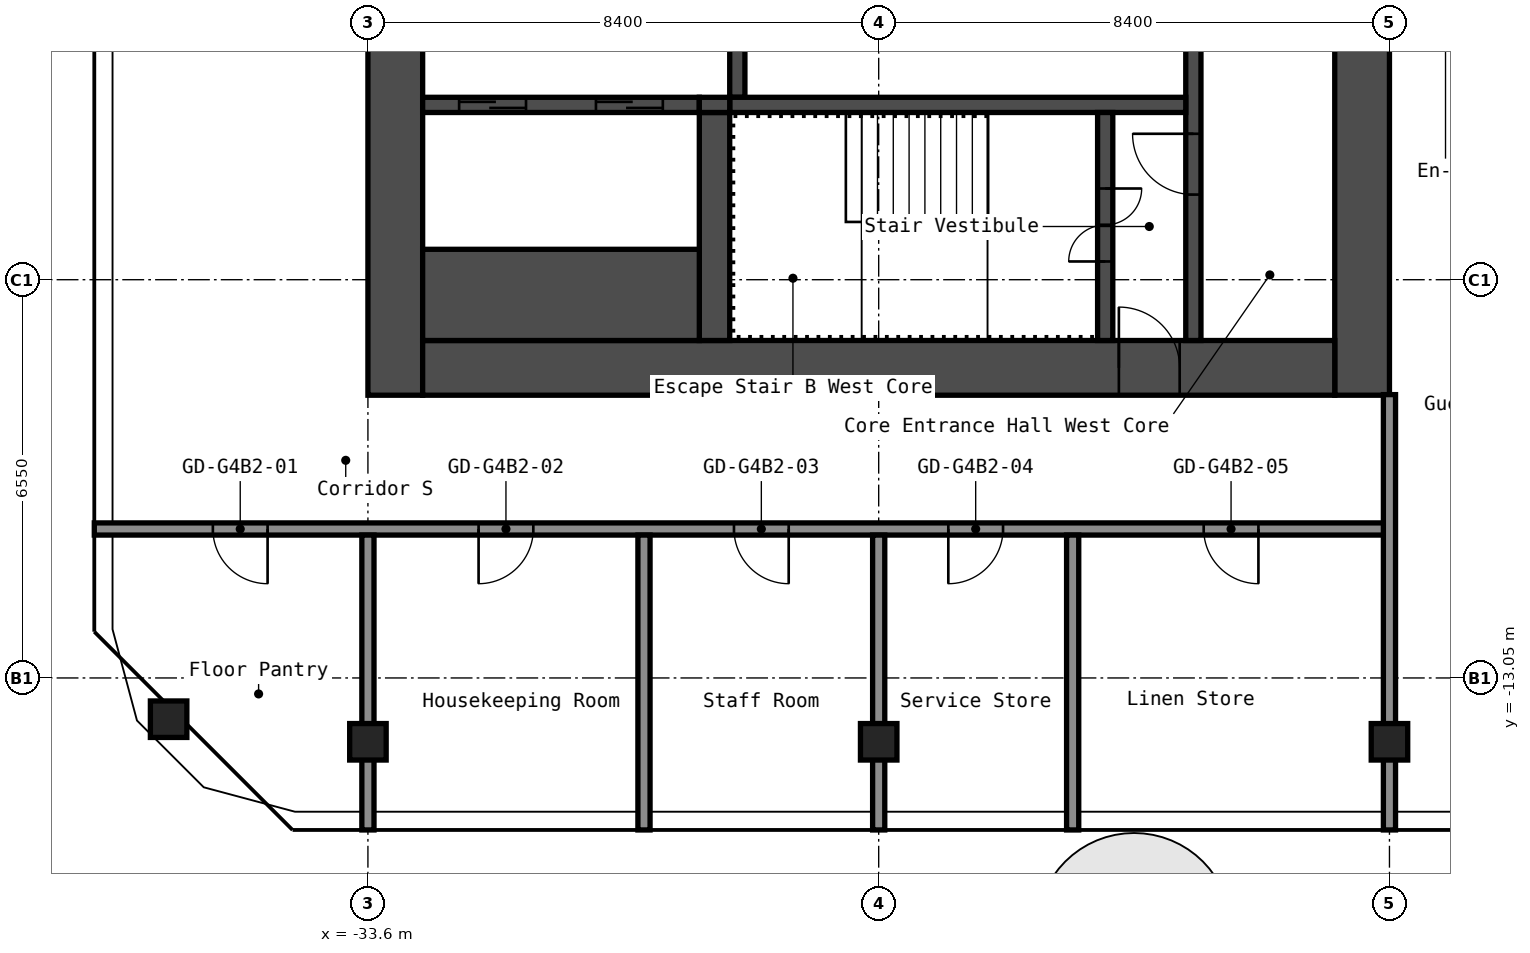
"""IFC4 building model, lengths in metres.
Left out: names, types, materials, properties, quantities, classifications, styles, units other than length and angle.
Written with IfcOpenShell. Run it as: python <this file> out.ifc"""

import sys

from ifc_helpers import new_model, si_unit, direction, frame, frame_2d, origin, origin_2d, place, context, subcontext, project, spatial, rectangle, hollow_rectangle, extrude, element, fill, save


model = new_model("IFC4")
c1 = context("Model", 3, precision=1e-05, world=origin(), true_north=direction((0.0, 1.0)))
c2 = subcontext(c1, "Body", "Model", "MODEL_VIEW")
j1 = project(units=[si_unit("LENGTHUNIT", "METRE"), si_unit("PLANEANGLEUNIT", "RADIAN")], contexts=[c1])
p1 = place(None, origin())
s1 = spatial("IfcSite", under=j1, at=p1, CompositionType="ELEMENT")
p2 = place(p1, origin())
s2 = spatial("IfcBuilding", under=s1, at=p2, CompositionType="ELEMENT")
p3 = place(p2, frame((0.0, 0.0, 221.8)))
s3 = spatial("IfcBuildingStorey", under=s2, at=p3, CompositionType="ELEMENT", Elevation=221.8)
for number, where, z_axis, x_axis in (
    (1, (-36.878, -13.729, 0.0), (0.0, 0.0, 1.0), (1.0, 0.0, 0.0)),
    (2, (-33.6, -14.1, 0.0), (0.0, 0.0, 1.0), (1.0, 0.0, 0.0)),
    (3, (-25.2, -14.1, 0.0), (0.0, 0.0, 1.0), (1.0, 0.0, 0.0)),
    (4, (-16.8, -14.1, 0.0), (0.0, 0.0, 1.0), (1.0, 0.0, 0.0)),
):
    element("IfcColumn", number, at=place(p3, frame(where, z_axis=z_axis, x_axis=x_axis)), inside=s3, PredefinedType="COLUMN", context=c2, shape_type="SweptSolid", body=[
        extrude(hollow_rectangle(XDim=0.6, YDim=0.6, WallThickness=0.025, InnerFilletRadius=0.038, OuterFilletRadius=0.062, at=origin_2d()), origin(), (0.0, 0.0, 1.0), 2.75),
    ])
p4 = place(p3, frame((-17.25, -8.4, 0.0), z_axis=(0.0, 0.0, 1.0), x_axis=(0.0, 1.0, 0.0)))
e5 = element("IfcWall", 5, at=p4, inside=s3, PredefinedType="SHEAR", context=c2, shape_type="SweptSolid", body=[
    extrude(rectangle(XDim=16.8, YDim=0.9, at=frame_2d((8.4, 0.0))), origin(), (0.0, 0.0, 1.0), 2.75),
])
p5 = place(p4, frame((10.1, 0.0, 0.0)))
e6 = element("IfcOpeningElement", 6, at=p5, cuts=e5, PredefinedType="OPENING", context=c2, shape_type="SweptSolid", body=[
    extrude(rectangle(XDim=1.6, YDim=2.1, at=frame_2d((0.8, 1.05))), frame((0.0, 0.46, 0.0), z_axis=(0.0, -1.0, 0.0), x_axis=(1.0, 0.0, 0.0)), (0.0, 0.0, 1.0), 0.92),
])
p6 = place(p3, frame((-33.15, -8.4, 0.0), z_axis=(0.0, 0.0, 1.0), x_axis=(0.0, 1.0, 0.0)))
e7 = element("IfcWall", 7, at=p6, inside=s3, PredefinedType="SHEAR", context=c2, shape_type="SweptSolid", body=[
    extrude(rectangle(XDim=16.8, YDim=0.9, at=frame_2d((8.4, 0.0))), origin(), (0.0, 0.0, 1.0), 2.75),
])
p7 = place(p3, frame((-32.7, -7.95, 0.0), z_axis=(0.0, 0.0, 1.0), x_axis=(1.0, 0.0, 0.0)))
e8 = element("IfcWall", 8, at=p7, inside=s3, PredefinedType="SHEAR", context=c2, shape_type="SweptSolid", body=[
    extrude(rectangle(XDim=15.0, YDim=0.9, at=frame_2d((7.5, 0.0))), origin(), (0.0, 0.0, 1.0), 2.75),
])
p8 = place(p7, frame((11.45, 0.0, 0.0)))
e9 = element("IfcOpeningElement", 9, at=p8, cuts=e8, PredefinedType="OPENING", context=c2, shape_type="SweptSolid", body=[
    extrude(rectangle(XDim=1.0, YDim=2.1, at=frame_2d((0.5, 1.05))), frame((0.0, 0.46, 0.0), z_axis=(0.0, -1.0, 0.0), x_axis=(1.0, 0.0, 0.0)), (0.0, 0.0, 1.0), 0.92),
])
p9 = place(p3, frame((-20.025, -7.5, 0.0), z_axis=(0.0, 0.0, 1.0), x_axis=(0.0, 1.0, 0.0)))
e10 = element("IfcWall", 10, at=p9, inside=s3, PredefinedType="SHEAR", context=c2, shape_type="SweptSolid", body=[
    extrude(rectangle(XDim=6.3, YDim=0.25, at=frame_2d((3.15, 0.0))), origin(), (0.0, 0.0, 1.0), 2.75),
])
p10 = place(p9, frame((2.4, 0.0, 0.0)))
e11 = element("IfcOpeningElement", 11, at=p10, cuts=e10, PredefinedType="OPENING", context=c2, shape_type="SweptSolid", body=[
    extrude(rectangle(XDim=1.0, YDim=2.1, at=frame_2d((0.5, 1.05))), frame((0.0, 0.135, 0.0), z_axis=(0.0, -1.0, 0.0), x_axis=(1.0, 0.0, 0.0)), (0.0, 0.0, 1.0), 0.27),
])
p11 = place(p3, frame((-27.525, -3.5, 0.0), z_axis=(0.0, 0.0, 1.0), x_axis=(0.0, 1.0, 0.0)))
e12 = element("IfcWall", 12, at=p11, inside=s3, PredefinedType="SHEAR", context=c2, shape_type="SweptSolid", body=[
    extrude(rectangle(XDim=2.05, YDim=0.25, at=frame_2d((1.025, 0.0))), origin(), (0.0, 0.0, 1.0), 2.75),
])
p12 = place(p3, frame((-27.65, -3.625, 0.0), z_axis=(0.0, 0.0, 1.0), x_axis=(1.0, 0.0, 0.0)))
e13 = element("IfcWall", 13, at=p12, inside=s3, PredefinedType="SHEAR", context=c2, shape_type="SweptSolid", body=[
    extrude(rectangle(XDim=7.5, YDim=0.25, at=frame_2d((3.75, 0.0))), origin(), (0.0, 0.0, 1.0), 2.75),
])
p13 = place(p3, frame((-21.475, -7.5, 0.0), z_axis=(0.0, 0.0, 1.0), x_axis=(0.0, 1.0, 0.0)))
e14 = element("IfcWall", 14, at=p13, inside=s3, PredefinedType="SHEAR", context=c2, shape_type="SweptSolid", body=[
    extrude(rectangle(XDim=3.75, YDim=0.25, at=frame_2d((1.875, 0.0))), origin(), (0.0, 0.0, 1.0), 2.75),
])
p14 = place(p13, frame((1.3, 0.0, 0.0)))
e15 = element("IfcOpeningElement", 15, at=p14, cuts=e14, PredefinedType="OPENING", context=c2, shape_type="SweptSolid", body=[
    extrude(rectangle(XDim=1.2, YDim=2.1, at=frame_2d((0.6, 1.05))), frame((0.0, 0.135, 0.0), z_axis=(0.0, -1.0, 0.0), x_axis=(1.0, 0.0, 0.0)), (0.0, 0.0, 1.0), 0.27),
])
p15 = place(p3, frame((-27.9, -7.5, 0.0), z_axis=(0.0, 0.0, 1.0), x_axis=(0.0, 1.0, 0.0)))
e16 = element("IfcWall", 16, at=p15, inside=s3, PredefinedType="SHEAR", context=c2, shape_type="SweptSolid", body=[
    extrude(rectangle(XDim=3.75, YDim=0.5, at=frame_2d((1.875, 0.0))), origin(), (0.0, 0.0, 1.0), 2.75),
])
p16 = place(p3, frame((-32.7, -3.625, 0.0), z_axis=(0.0, 0.0, 1.0), x_axis=(1.0, 0.0, 0.0)))
e17 = element("IfcWall", 17, at=p16, inside=s3, PredefinedType="SHEAR", context=c2, shape_type="SweptSolid", body=[
    extrude(rectangle(XDim=4.55, YDim=0.25, at=frame_2d((2.275, 0.0))), origin(), (0.0, 0.0, 1.0), 2.75),
])
p17 = place(p16, frame((2.85, 0.0, 0.0)))
e18 = element("IfcOpeningElement", 18, at=p17, cuts=e17, PredefinedType="OPENING", context=c2, shape_type="SweptSolid", body=[
    extrude(rectangle(XDim=1.1, YDim=2.1, at=frame_2d((0.55, 1.05))), frame((0.0, 0.135, 0.0), z_axis=(0.0, -1.0, 0.0), x_axis=(1.0, 0.0, 0.0)), (0.0, 0.0, 1.0), 0.27),
])
p18 = place(p16, frame((0.6, 0.0, 0.0)))
e19 = element("IfcOpeningElement", 19, at=p18, cuts=e17, PredefinedType="OPENING", context=c2, shape_type="SweptSolid", body=[
    extrude(rectangle(XDim=1.1, YDim=2.1, at=frame_2d((0.55, 1.05))), frame((0.0, 0.135, 0.0), z_axis=(0.0, -1.0, 0.0), x_axis=(1.0, 0.0, 0.0)), (0.0, 0.0, 1.0), 0.27),
])
p19 = place(p3, frame((-32.7, -6.75, 0.0), z_axis=(0.0, 0.0, 1.0), x_axis=(1.0, 0.0, 0.0)))
e20 = element("IfcWall", 20, at=p19, inside=s3, PredefinedType="SHEAR", context=c2, shape_type="SweptSolid", body=[
    extrude(rectangle(XDim=4.55, YDim=1.5, at=frame_2d((2.275, 0.0))), origin(), (0.0, 0.0, 1.0), 2.75),
])
p20 = place(p3, frame((-28.15, -3.625, 0.0), z_axis=(0.0, 0.0, 1.0), x_axis=(1.0, 0.0, 0.0)))
e21 = element("IfcWall", 21, at=p20, inside=s3, PredefinedType="SHEAR", context=c2, shape_type="SweptSolid", body=[
    extrude(rectangle(XDim=0.5, YDim=0.25, at=frame_2d((0.25, 0.0))), origin(), (0.0, 0.0, 1.0), 2.75),
])
p21 = place(p3, frame((-38.1, -10.6, 0.0), z_axis=(0.0, 0.0, 1.0), x_axis=(1.0, 0.0, 0.0)))
e22 = element("IfcWall", 22, at=p21, inside=s3, PredefinedType="PARTITIONING", context=c2, shape_type="SweptSolid", body=[
    extrude(rectangle(XDim=21.3, YDim=0.2, at=frame_2d((10.65, 0.0))), origin(), (0.0, 0.0, 1.0), 2.75),
])
p22 = place(p21, frame((1.95, 0.0, 0.0)))
e23 = element("IfcOpeningElement", 23, at=p22, cuts=e22, PredefinedType="OPENING", context=c2, shape_type="SweptSolid", body=[
    extrude(rectangle(XDim=0.9, YDim=2.1, at=frame_2d((0.45, 1.05))), frame((0.0, 0.11, 0.0), z_axis=(0.0, -1.0, 0.0), x_axis=(1.0, 0.0, 0.0)), (0.0, 0.0, 1.0), 0.22),
])
p23 = place(p21, frame((6.32, 0.0, 0.0)))
e24 = element("IfcOpeningElement", 24, at=p23, cuts=e22, PredefinedType="OPENING", context=c2, shape_type="SweptSolid", body=[
    extrude(rectangle(XDim=0.9, YDim=2.1, at=frame_2d((0.45, 1.05))), frame((0.0, 0.11, 0.0), z_axis=(0.0, -1.0, 0.0), x_axis=(1.0, 0.0, 0.0)), (0.0, 0.0, 1.0), 0.22),
])
p24 = place(p21, frame((10.52, 0.0, 0.0)))
e25 = element("IfcOpeningElement", 25, at=p24, cuts=e22, PredefinedType="OPENING", context=c2, shape_type="SweptSolid", body=[
    extrude(rectangle(XDim=0.9, YDim=2.1, at=frame_2d((0.45, 1.05))), frame((0.0, 0.11, 0.0), z_axis=(0.0, -1.0, 0.0), x_axis=(1.0, 0.0, 0.0)), (0.0, 0.0, 1.0), 0.22),
])
p25 = place(p21, frame((14.045, 0.0, 0.0)))
e26 = element("IfcOpeningElement", 26, at=p25, cuts=e22, PredefinedType="OPENING", context=c2, shape_type="SweptSolid", body=[
    extrude(rectangle(XDim=0.9, YDim=2.1, at=frame_2d((0.45, 1.05))), frame((0.0, 0.11, 0.0), z_axis=(0.0, -1.0, 0.0), x_axis=(1.0, 0.0, 0.0)), (0.0, 0.0, 1.0), 0.22),
])
p26 = place(p21, frame((18.245, 0.0, 0.0)))
e27 = element("IfcOpeningElement", 27, at=p26, cuts=e22, PredefinedType="OPENING", context=c2, shape_type="SweptSolid", body=[
    extrude(rectangle(XDim=0.9, YDim=2.1, at=frame_2d((0.45, 1.05))), frame((0.0, 0.11, 0.0), z_axis=(0.0, -1.0, 0.0), x_axis=(1.0, 0.0, 0.0)), (0.0, 0.0, 1.0), 0.22),
])
for number, where, z_axis, x_axis in (
    (28, (-33.6, -15.55, 0.0), (0.0, 0.0, 1.0), (0.0, 1.0, 0.0)),
    (29, (-29.06, -15.55, 0.0), (0.0, 0.0, 1.0), (0.0, 1.0, 0.0)),
    (30, (-25.2, -15.55, 0.0), (0.0, 0.0, 1.0), (0.0, 1.0, 0.0)),
    (31, (-22.01, -15.55, 0.0), (0.0, 0.0, 1.0), (0.0, 1.0, 0.0)),
):
    element("IfcWall", number, at=place(p3, frame(where, z_axis=z_axis, x_axis=x_axis)), inside=s3, PredefinedType="PARTITIONING", context=c2, shape_type="SweptSolid", body=[
        extrude(rectangle(XDim=4.85, YDim=0.2, at=frame_2d((2.425, 0.0))), origin(), (0.0, 0.0, 1.0), 2.75),
    ])
p27 = place(p3, frame((-16.8, -15.55, 0.0), z_axis=(0.0, 0.0, 1.0), x_axis=(0.0, 1.0, 0.0)))
e32 = element("IfcWall", 32, at=p27, inside=s3, PredefinedType="PARTITIONING", context=c2, shape_type="SweptSolid", body=[
    extrude(rectangle(XDim=7.16, YDim=0.2, at=frame_2d((3.58, 0.0))), origin(), (0.0, 0.0, 1.0), 2.75),
])
p28 = place(p8, origin())
e33 = element("IfcDoor", 33, at=p28, inside=s3, OperationType="SINGLE_SWING_RIGHT", PredefinedType="DOOR", context=c2, shape_type="SweptSolid", body=[
    extrude(rectangle(XDim=1.0, YDim=2.1, at=frame_2d((0.5, 1.05))), frame((0.0, 0.025, 0.0), z_axis=(0.0, -1.0, 0.0), x_axis=(1.0, 0.0, 0.0)), (0.0, 0.0, 1.0), 0.05),
])
fill(e9, e33)
p29 = place(p14, origin())
e34 = element("IfcDoor", 34, at=p29, inside=s3, OperationType="DOUBLE_DOOR_SINGLE_SWING", PredefinedType="DOOR", context=c2, shape_type="SweptSolid", body=[
    extrude(rectangle(XDim=1.2, YDim=2.1, at=frame_2d((0.6, 1.05))), frame((0.0, 0.025, 0.0), z_axis=(0.0, -1.0, 0.0), x_axis=(1.0, 0.0, 0.0)), (0.0, 0.0, 1.0), 0.05),
])
fill(e15, e34)
p30 = place(p10, origin())
e35 = element("IfcDoor", 35, at=p30, inside=s3, OperationType="SINGLE_SWING_LEFT", PredefinedType="DOOR", context=c2, shape_type="SweptSolid", body=[
    extrude(rectangle(XDim=1.0, YDim=2.1, at=frame_2d((0.5, 1.05))), frame((0.0, 0.025, 0.0), z_axis=(0.0, -1.0, 0.0), x_axis=(1.0, 0.0, 0.0)), (0.0, 0.0, 1.0), 0.05),
])
fill(e11, e35)
p31 = place(p17, origin())
e36 = element("IfcDoor", 36, at=p31, inside=s3, OperationType="DOUBLE_DOOR_SLIDING", PredefinedType="DOOR", context=c2, shape_type="SweptSolid", body=[
    extrude(rectangle(XDim=1.1, YDim=2.1, at=frame_2d((0.55, 1.05))), frame((0.0, 0.025, 0.0), z_axis=(0.0, -1.0, 0.0), x_axis=(1.0, 0.0, 0.0)), (0.0, 0.0, 1.0), 0.05),
])
fill(e18, e36)
p32 = place(p18, origin())
e37 = element("IfcDoor", 37, at=p32, inside=s3, OperationType="DOUBLE_DOOR_SLIDING", PredefinedType="DOOR", context=c2, shape_type="SweptSolid", body=[
    extrude(rectangle(XDim=1.1, YDim=2.1, at=frame_2d((0.55, 1.05))), frame((0.0, 0.025, 0.0), z_axis=(0.0, -1.0, 0.0), x_axis=(1.0, 0.0, 0.0)), (0.0, 0.0, 1.0), 0.05),
])
fill(e19, e37)
p33 = place(p22, origin())
e38 = element("IfcDoor", 38, at=p33, inside=s3, OperationType="SINGLE_SWING_RIGHT", PredefinedType="DOOR", context=c2, shape_type="SweptSolid", body=[
    extrude(rectangle(XDim=0.9, YDim=2.1, at=frame_2d((0.45, 1.05))), frame((0.0, 0.025, 0.0), z_axis=(0.0, -1.0, 0.0), x_axis=(1.0, 0.0, 0.0)), (0.0, 0.0, 1.0), 0.05),
])
fill(e23, e38)
p34 = place(p23, origin())
e39 = element("IfcDoor", 39, at=p34, inside=s3, OperationType="SINGLE_SWING_LEFT", PredefinedType="DOOR", context=c2, shape_type="SweptSolid", body=[
    extrude(rectangle(XDim=0.9, YDim=2.1, at=frame_2d((0.45, 1.05))), frame((0.0, 0.025, 0.0), z_axis=(0.0, -1.0, 0.0), x_axis=(1.0, 0.0, 0.0)), (0.0, 0.0, 1.0), 0.05),
])
fill(e24, e39)
p35 = place(p24, origin())
e40 = element("IfcDoor", 40, at=p35, inside=s3, OperationType="SINGLE_SWING_RIGHT", PredefinedType="DOOR", context=c2, shape_type="SweptSolid", body=[
    extrude(rectangle(XDim=0.9, YDim=2.1, at=frame_2d((0.45, 1.05))), frame((0.0, 0.025, 0.0), z_axis=(0.0, -1.0, 0.0), x_axis=(1.0, 0.0, 0.0)), (0.0, 0.0, 1.0), 0.05),
])
fill(e25, e40)
p36 = place(p25, origin())
e41 = element("IfcDoor", 41, at=p36, inside=s3, OperationType="SINGLE_SWING_LEFT", PredefinedType="DOOR", context=c2, shape_type="SweptSolid", body=[
    extrude(rectangle(XDim=0.9, YDim=2.1, at=frame_2d((0.45, 1.05))), frame((0.0, 0.025, 0.0), z_axis=(0.0, -1.0, 0.0), x_axis=(1.0, 0.0, 0.0)), (0.0, 0.0, 1.0), 0.05),
])
fill(e26, e41)
p37 = place(p26, origin())
e42 = element("IfcDoor", 42, at=p37, inside=s3, OperationType="SINGLE_SWING_RIGHT", PredefinedType="DOOR", context=c2, shape_type="SweptSolid", body=[
    extrude(rectangle(XDim=0.9, YDim=2.1, at=frame_2d((0.45, 1.05))), frame((0.0, 0.025, 0.0), z_axis=(0.0, -1.0, 0.0), x_axis=(1.0, 0.0, 0.0)), (0.0, 0.0, 1.0), 0.05),
])
fill(e27, e42)
save(model, sys.argv[1])
